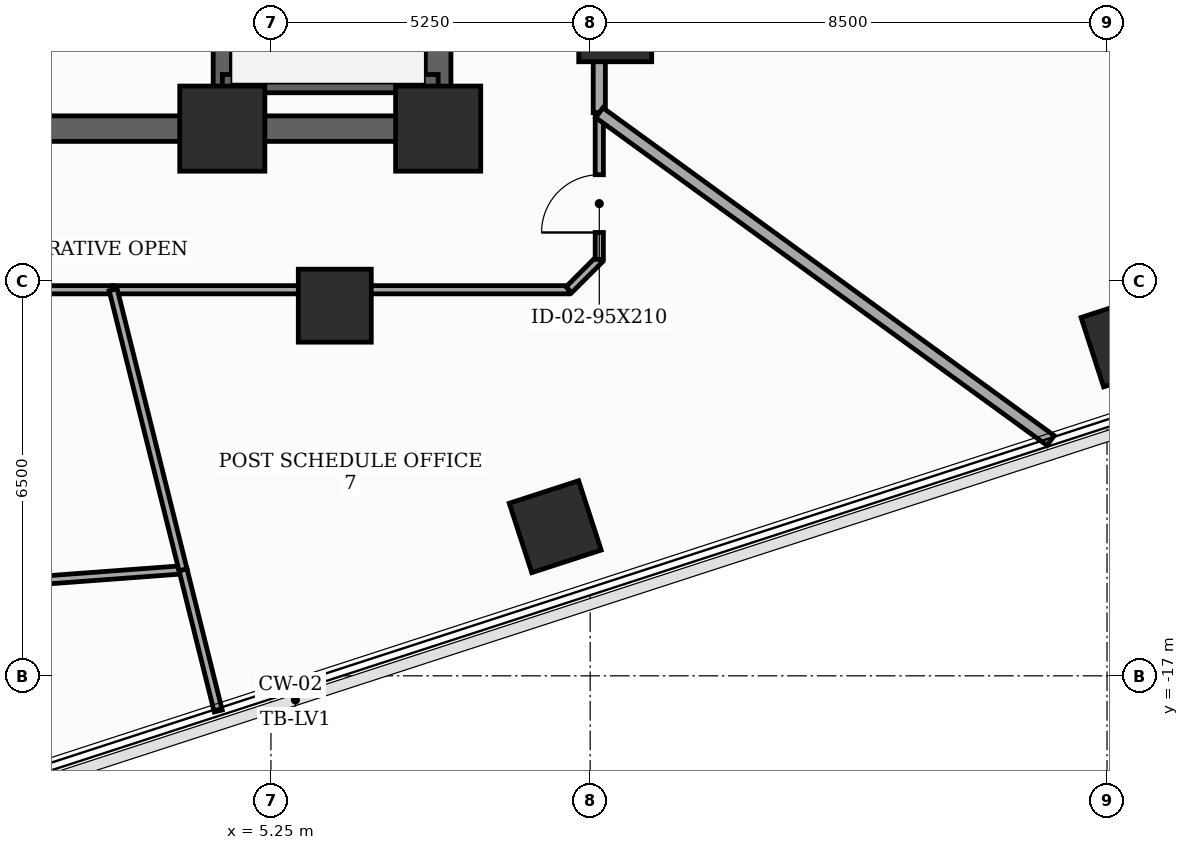
"""IFC4 building model, lengths in metres.
Left out: names, types, materials, properties, quantities, classifications, styles, units other than length and angle.
Written with IfcOpenShell. Run it as: python <this file> out.ifc"""

import sys

from ifc_helpers import new_model, si_unit, direction, frame, frame_2d, origin, origin_2d, place, context, subcontext, project, spatial, rectangle, extrude, element, fill, save


model = new_model("IFC4")
c1 = context("Model", 3, precision=1e-05, world=origin(), true_north=direction((0.0, 1.0)))
c2 = subcontext(c1, "Body", "Model", "MODEL_VIEW")
j1 = project(units=[si_unit("LENGTHUNIT", "METRE"), si_unit("PLANEANGLEUNIT", "RADIAN")], contexts=[c1])
p1 = place(None, origin())
s1 = spatial("IfcSite", under=j1, at=p1, CompositionType="ELEMENT")
p2 = place(p1, origin())
s2 = spatial("IfcBuilding", under=s1, at=p2, CompositionType="ELEMENT")
p3 = place(p2, frame((0.0, 0.0, 94.0)))
s3 = spatial("IfcBuildingStorey", under=s2, at=p3, CompositionType="ELEMENT", Elevation=94.0)
for number, where, z_axis, x_axis in (
    (1, (4.45, -8.0, 0.0), (0.0, 0.0, 1.0), (1.0, 0.0, 0.0)),
    (2, (8.0, -8.0, 0.0), (0.0, 0.0, 1.0), (1.0, 0.0, 0.0)),
):
    element("IfcColumn", number, at=place(p3, frame(where, z_axis=z_axis, x_axis=x_axis)), inside=s3, PredefinedType="COLUMN", context=c2, shape_type="SweptSolid", body=[
        extrude(rectangle(XDim=1.4, YDim=1.4, at=origin_2d()), origin(), (0.0, 0.0, 1.0), 3.7),
    ])
for number, where, z_axis, x_axis in (
    (3, (6.3, -10.912, 0.0), (0.0, 0.0, 1.0), (1.0, 0.0, 0.0)),
    (4, (10.912, -6.3, 0.0), (0.0, 0.0, 1.0), (1.0, 0.0, 0.0)),
    (5, (9.925, -14.547, 0.0), (0.0, 0.0, 1.0), (0.951, 0.309, 0.0)),
    (6, (19.329, -11.491, 0.0), (0.0, 0.0, 1.0), (0.951, 0.309, 0.0)),
):
    element("IfcColumn", number, at=place(p3, frame(where, z_axis=z_axis, x_axis=x_axis)), inside=s3, PredefinedType="COLUMN", context=c2, shape_type="SweptSolid", body=[
        extrude(rectangle(XDim=1.2, YDim=1.2, at=origin_2d()), origin(), (0.0, 0.0, 1.0), 3.7),
    ])
p4 = place(p3, frame((8.0, -8.0, 0.0), z_axis=(0.0, 0.0, 1.0), x_axis=(0.0, 1.0, 0.0)))
e7 = element("IfcWall", 7, at=p4, inside=s3, PredefinedType="SHEAR", context=c2, shape_type="SweptSolid", body=[
    extrude(rectangle(XDim=16.0, YDim=0.42, at=frame_2d((8.0, 0.0))), origin(), (0.0, 0.0, 1.0), 3.5),
])
p5 = place(p4, frame((9.6, 0.0, 0.0)))
e8 = element("IfcOpeningElement", 8, at=p5, cuts=e7, PredefinedType="OPENING", context=c2, shape_type="SweptSolid", body=[
    extrude(rectangle(XDim=1.05, YDim=2.15, at=frame_2d((0.525, 1.075))), frame((0.0, 0.22, 0.0), z_axis=(0.0, -1.0, 0.0), x_axis=(1.0, 0.0, 0.0)), (0.0, 0.0, 1.0), 0.44),
])
p6 = place(p4, frame((14.229, 0.0, 0.0)))
e9 = element("IfcOpeningElement", 9, at=p6, cuts=e7, PredefinedType="OPENING", context=c2, shape_type="SweptSolid", body=[
    extrude(rectangle(XDim=0.85, YDim=2.02, at=frame_2d((0.425, 1.01))), frame((0.0, 0.22, 0.0), z_axis=(0.0, -1.0, 0.0), x_axis=(1.0, 0.0, 0.0)), (0.0, 0.0, 1.0), 0.44),
])
p7 = place(p3, frame((-8.0, -8.0, 0.0), z_axis=(0.0, 0.0, 1.0), x_axis=(1.0, 0.0, 0.0)))
e10 = element("IfcWall", 10, at=p7, inside=s3, PredefinedType="SHEAR", context=c2, shape_type="SweptSolid", body=[
    extrude(rectangle(XDim=16.0, YDim=0.42, at=frame_2d((8.0, 0.0))), origin(), (0.0, 0.0, 1.0), 3.5),
])
p8 = place(p7, frame((7.52, 0.0, 0.0)))
e11 = element("IfcOpeningElement", 11, at=p8, cuts=e10, PredefinedType="OPENING", context=c2, shape_type="SweptSolid", body=[
    extrude(rectangle(XDim=0.95, YDim=2.1, at=frame_2d((0.475, 1.05))), frame((0.0, 0.22, 0.0), z_axis=(0.0, -1.0, 0.0), x_axis=(1.0, 0.0, 0.0)), (0.0, 0.0, 1.0), 0.44),
])
p9 = place(p3, frame((4.45, -7.79, 0.0), z_axis=(0.0, 0.0, 1.0), x_axis=(0.0, 1.0, 0.0)))
e12 = element("IfcWall", 12, at=p9, inside=s3, PredefinedType="SHEAR", context=c2, shape_type="SweptSolid", body=[
    extrude(rectangle(XDim=15.58, YDim=0.3, at=frame_2d((7.79, 0.0))), origin(), (0.0, 0.0, 1.0), 3.5),
])
p10 = place(p3, frame((4.45, -7.26, 0.0), z_axis=(0.0, 0.0, 1.0), x_axis=(1.0, 0.0, 0.0)))
e13 = element("IfcWall", 13, at=p10, inside=s3, PredefinedType="SHEAR", context=c2, shape_type="SweptSolid", body=[
    extrude(rectangle(XDim=3.55, YDim=0.3, at=frame_2d((1.775, 0.0))), origin(), (0.0, 0.0, 1.0), 3.5),
])
p11 = place(p3, frame((10.65, -7.738, 0.0), z_axis=(0.0, 0.0, 1.0), x_axis=(0.0, 1.0, 0.0)))
e14 = element("IfcWall", 14, at=p11, inside=s3, PredefinedType="SOLIDWALL", context=c2, shape_type="SweptSolid", body=[
    extrude(rectangle(XDim=3.746, YDim=0.2, at=frame_2d((1.873, 0.0))), origin(), (0.0, 0.0, 1.0), 2.785),
])
p12 = place(p3, frame((10.65, -3.992, 0.0), z_axis=(0.0, 0.0, 1.0), x_axis=(0.965906888357, -0.258889712088, 0.0)))
e15 = element("IfcWall", 15, at=p12, inside=s3, PredefinedType="SOLIDWALL", context=c2, shape_type="SweptSolid", body=[
    extrude(rectangle(XDim=11.28, YDim=0.2, at=frame_2d((5.64, 0.0))), origin(), (0.0, 0.0, 1.0), 2.785),
])
p13 = place(p3, frame((-1.715, -10.65, 0.0), z_axis=(0.0, 0.0, 1.0), x_axis=(1.0, 0.0, 0.0)))
e16 = element("IfcWall", 16, at=p13, inside=s3, PredefinedType="PARTITIONING", context=c2, shape_type="SweptSolid", body=[
    extrude(rectangle(XDim=4.37, YDim=0.135, at=frame_2d((2.185, 0.0))), origin(), (0.0, 0.0, 1.0), 2.785),
])
p14 = place(p3, frame((2.655, -10.65, 0.0), z_axis=(0.0, 0.0, 1.0), x_axis=(1.0, 0.0, 0.0)))
e17 = element("IfcWall", 17, at=p14, inside=s3, PredefinedType="PARTITIONING", context=c2, shape_type="SweptSolid", body=[
    extrude(rectangle(XDim=7.495, YDim=0.135, at=frame_2d((3.748, 0.0))), origin(), (0.0, 0.0, 1.0), 2.785),
])
p15 = place(p3, frame((10.15, -10.65, 0.0), z_axis=(0.0, 0.0, 1.0), x_axis=(0.707106781187, 0.707106781187, 0.0)))
e18 = element("IfcWall", 18, at=p15, inside=s3, PredefinedType="PARTITIONING", context=c2, shape_type="SweptSolid", body=[
    extrude(rectangle(XDim=0.707, YDim=0.135, at=frame_2d((0.354, 0.0))), origin(), (0.0, 0.0, 1.0), 3.5),
])
p16 = place(p3, frame((10.65, -10.15, 0.0), z_axis=(0.0, 0.0, 1.0), x_axis=(0.0, 1.0, 0.0)))
e19 = element("IfcWall", 19, at=p16, inside=s3, PredefinedType="PARTITIONING", context=c2, shape_type="SweptSolid", body=[
    extrude(rectangle(XDim=2.412, YDim=0.135, at=frame_2d((1.206, 0.0))), origin(), (0.0, 0.0, 1.0), 3.5),
])
p17 = place(p16, frame((0.442, 0.0, 0.0)))
e20 = element("IfcOpeningElement", 20, at=p17, cuts=e19, PredefinedType="OPENING", context=c2, shape_type="SweptSolid", body=[
    extrude(rectangle(XDim=0.95, YDim=2.1, at=frame_2d((0.475, 1.05))), frame((0.0, 0.077, 0.0), z_axis=(0.0, -1.0, 0.0), x_axis=(1.0, 0.0, 0.0)), (0.0, 0.0, 1.0), 0.155),
])
p18 = place(p3, frame((10.65, -7.738, 0.0), z_axis=(0.0, 0.0, 1.0), x_axis=(0.809037487075, -0.587757045477, 0.0)))
e21 = element("IfcWall", 21, at=p18, inside=s3, PredefinedType="SOLIDWALL", context=c2, shape_type="SweptSolid", body=[
    extrude(rectangle(XDim=9.174, YDim=0.2, at=frame_2d((4.587, 0.0))), origin(), (0.0, 0.0, 1.0), 2.935),
])
p19 = place(p3, frame((3.804, -15.256, 0.0), z_axis=(0.0, 0.0, 1.0), x_axis=(-0.99725056907, -0.07410332307, 0.0)))
e22 = element("IfcWall", 22, at=p19, inside=s3, PredefinedType="PARTITIONING", context=c2, shape_type="SweptSolid", body=[
    extrude(rectangle(XDim=5.746, YDim=0.135, at=frame_2d((2.873, 0.0))), origin(), (0.0, 0.0, 1.0), 2.785),
])
p20 = place(p3, frame((4.383, -17.578, 0.0), z_axis=(0.0, 0.0, 1.0), x_axis=(-0.241887449135, 0.970304314095, 0.0)))
e23 = element("IfcWall", 23, at=p20, inside=s3, PredefinedType="PARTITIONING", context=c2, shape_type="SweptSolid", body=[
    extrude(rectangle(XDim=2.393, YDim=0.135, at=frame_2d((1.197, 0.0))), origin(), (0.0, 0.0, 1.0), 2.935),
])
p21 = place(p3, frame((3.804, -15.256, 0.0), z_axis=(0.0, 0.0, 1.0), x_axis=(-0.24201527033, 0.970272440569, 0.0)))
e24 = element("IfcWall", 24, at=p21, inside=s3, PredefinedType="PARTITIONING", context=c2, shape_type="SweptSolid", body=[
    extrude(rectangle(XDim=4.747, YDim=0.135, at=frame_2d((2.374, 0.0))), origin(), (0.0, 0.0, 1.0), 2.785),
])
p22 = place(p17, origin())
e25 = element("IfcDoor", 25, at=p22, inside=s3, OperationType="SINGLE_SWING_LEFT", PredefinedType="DOOR", context=c2, shape_type="SweptSolid", body=[
    extrude(rectangle(XDim=0.95, YDim=2.1, at=frame_2d((0.475, 1.05))), frame((0.0, 0.025, 0.0), z_axis=(0.0, -1.0, 0.0), x_axis=(1.0, 0.0, 0.0)), (0.0, 0.0, 1.0), 0.05),
])
fill(e20, e25)
save(model, sys.argv[1])
